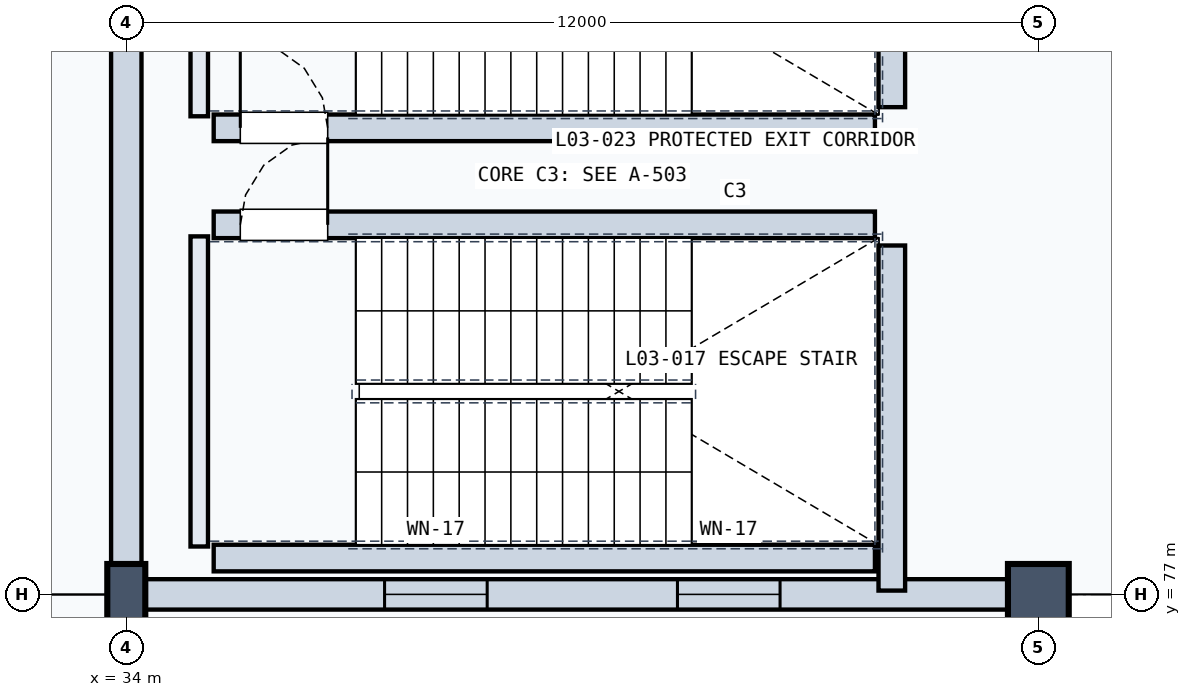
"""IFC4 building model, lengths in metres.
Left out: names, types, materials, properties, quantities, classifications, styles, units other than length and angle.
Written with IfcOpenShell. Run it as: python <this file> out.ifc"""

import sys

from ifc_helpers import new_model, si_unit, direction, frame, frame_2d, origin, origin_2d, place, context, subcontext, project, spatial, rectangle, extrude, element, fill, save


model = new_model("IFC4")
c1 = context("Model", 3, precision=1e-05, world=origin(), true_north=direction((0.0, 1.0)))
c2 = subcontext(c1, "Body", "Model", "MODEL_VIEW")
j1 = project(units=[si_unit("LENGTHUNIT", "METRE"), si_unit("PLANEANGLEUNIT", "RADIAN")], contexts=[c1])
p1 = place(None, origin())
s1 = spatial("IfcSite", under=j1, at=p1, CompositionType="ELEMENT")
p2 = place(p1, origin())
s2 = spatial("IfcBuilding", under=s1, at=p2, CompositionType="ELEMENT")
p3 = place(p2, frame((0.0, 0.0, 14.7)))
s3 = spatial("IfcBuildingStorey", under=s2, at=p3, CompositionType="ELEMENT", Elevation=14.7)
p4 = place(p3, frame((34.0, 77.0, 0.0), z_axis=(0.0, 0.0, 1.0), x_axis=(1.0, 0.0, 0.0)))
e1 = element("IfcColumn", 1, at=p4, inside=s3, PredefinedType="COLUMN", context=c2, shape_type="SweptSolid", body=[
    extrude(rectangle(XDim=0.5, YDim=0.8, at=origin_2d()), origin(), (0.0, 0.0, 1.0), 4.8),
])
p5 = place(p3, frame((46.0, 77.0, 0.0), z_axis=(0.0, 0.0, 1.0), x_axis=(1.0, 0.0, 0.0)))
e2 = element("IfcColumn", 2, at=p5, inside=s3, PredefinedType="COLUMN", context=c2, shape_type="SweptSolid", body=[
    extrude(rectangle(XDim=0.8, YDim=0.8, at=origin_2d()), origin(), (0.0, 0.0, 1.0), 4.8),
])
p6 = place(p3, frame((34.22, 77.0, 0.0), z_axis=(0.0, 0.0, 1.0), x_axis=(1.0, 0.0, 0.0)))
e3 = element("IfcWall", 3, at=p6, inside=s3, PredefinedType="SOLIDWALL", context=c2, shape_type="SweptSolid", body=[
    extrude(rectangle(XDim=11.56, YDim=0.4, at=frame_2d((5.78, 0.0))), origin(), (0.0, 0.0, 1.0), 3.79),
])
p7 = place(p6, frame((3.178, 0.0, 0.8)))
e4 = element("IfcOpeningElement", 4, at=p7, cuts=e3, PredefinedType="OPENING", context=c2, shape_type="SweptSolid", body=[
    extrude(rectangle(XDim=1.35, YDim=2.1, at=frame_2d((0.675, 1.05))), frame((0.0, 0.21, 0.0), z_axis=(0.0, -1.0, 0.0), x_axis=(1.0, 0.0, 0.0)), (0.0, 0.0, 1.0), 0.42),
])
p8 = place(p6, frame((7.032, 0.0, 0.8)))
e5 = element("IfcOpeningElement", 5, at=p8, cuts=e3, PredefinedType="OPENING", context=c2, shape_type="SweptSolid", body=[
    extrude(rectangle(XDim=1.35, YDim=2.1, at=frame_2d((0.675, 1.05))), frame((0.0, 0.21, 0.0), z_axis=(0.0, -1.0, 0.0), x_axis=(1.0, 0.0, 0.0)), (0.0, 0.0, 1.0), 0.42),
])
p9 = place(p3, frame((34.0, 77.22, 0.0), z_axis=(0.0, 0.0, 1.0), x_axis=(0.0, 1.0, 0.0)))
e6 = element("IfcWall", 6, at=p9, inside=s3, PredefinedType="SOLIDWALL", context=c2, shape_type="SweptSolid", body=[
    extrude(rectangle(XDim=10.56, YDim=0.4, at=frame_2d((5.28, 0.0))), origin(), (0.0, 0.0, 1.0), 3.79),
])
p10 = place(p3, frame((34.96, 77.63, 0.0), z_axis=(0.0, 0.0, 1.0), x_axis=(0.0, 1.0, 0.0)))
e7 = element("IfcWall", 7, at=p10, inside=s3, PredefinedType="SOLIDWALL", context=c2, shape_type="SweptSolid", body=[
    extrude(rectangle(XDim=4.08, YDim=0.23, at=frame_2d((2.04, 0.0))), origin(), (0.0, 0.0, 1.0), 4.46),
])
p11 = place(p3, frame((44.072, 77.05, 0.0), z_axis=(0.0, 0.0, 1.0), x_axis=(0.0, 1.0, 0.0)))
e8 = element("IfcWall", 8, at=p11, inside=s3, PredefinedType="SOLIDWALL", context=c2, shape_type="SweptSolid", body=[
    extrude(rectangle(XDim=4.54, YDim=0.35, at=frame_2d((2.27, 0.0))), origin(), (0.0, 0.0, 1.0), 4.46),
])
p12 = place(p3, frame((35.15, 77.478, 0.0), z_axis=(0.0, 0.0, 1.0), x_axis=(1.0, 0.0, 0.0)))
e9 = element("IfcWall", 9, at=p12, inside=s3, PredefinedType="SOLIDWALL", context=c2, shape_type="SweptSolid", body=[
    extrude(rectangle(XDim=8.7, YDim=0.35, at=frame_2d((4.35, 0.0))), origin(), (0.0, 0.0, 1.0), 4.46),
])
p13 = place(p3, frame((35.15, 81.862, 0.0), z_axis=(0.0, 0.0, 1.0), x_axis=(1.0, 0.0, 0.0)))
e10 = element("IfcWall", 10, at=p13, inside=s3, PredefinedType="SOLIDWALL", context=c2, shape_type="SweptSolid", body=[
    extrude(rectangle(XDim=8.7, YDim=0.35, at=frame_2d((4.35, 0.0))), origin(), (0.0, 0.0, 1.0), 4.46),
])
p14 = place(p13, frame((0.35, 0.0, 0.0)))
e11 = element("IfcOpeningElement", 11, at=p14, cuts=e10, PredefinedType="OPENING", context=c2, shape_type="SweptSolid", body=[
    extrude(rectangle(XDim=1.15, YDim=2.2, at=frame_2d((0.575, 1.1))), frame((0.0, 0.185, 0.0), z_axis=(0.0, -1.0, 0.0), x_axis=(1.0, 0.0, 0.0)), (0.0, 0.0, 1.0), 0.37),
])
p15 = place(p3, frame((34.96, 83.29, 0.0), z_axis=(0.0, 0.0, 1.0), x_axis=(0.0, 1.0, 0.0)))
e12 = element("IfcWall", 12, at=p15, inside=s3, PredefinedType="SOLIDWALL", context=c2, shape_type="SweptSolid", body=[
    extrude(rectangle(XDim=4.08, YDim=0.23, at=frame_2d((2.04, 0.0))), origin(), (0.0, 0.0, 1.0), 4.46),
])
p16 = place(p3, frame((44.072, 83.41, 0.0), z_axis=(0.0, 0.0, 1.0), x_axis=(0.0, 1.0, 0.0)))
e13 = element("IfcWall", 13, at=p16, inside=s3, PredefinedType="SOLIDWALL", context=c2, shape_type="SweptSolid", body=[
    extrude(rectangle(XDim=3.84, YDim=0.35, at=frame_2d((1.92, 0.0))), origin(), (0.0, 0.0, 1.0), 4.46),
])
p17 = place(p3, frame((35.15, 83.138, 0.0), z_axis=(0.0, 0.0, 1.0), x_axis=(1.0, 0.0, 0.0)))
e14 = element("IfcWall", 14, at=p17, inside=s3, PredefinedType="SOLIDWALL", context=c2, shape_type="SweptSolid", body=[
    extrude(rectangle(XDim=8.7, YDim=0.35, at=frame_2d((4.35, 0.0))), origin(), (0.0, 0.0, 1.0), 4.46),
])
p18 = place(p17, frame((0.35, 0.0, 0.0)))
e15 = element("IfcOpeningElement", 15, at=p18, cuts=e14, PredefinedType="OPENING", context=c2, shape_type="SweptSolid", body=[
    extrude(rectangle(XDim=1.15, YDim=2.2, at=frame_2d((0.575, 1.1))), frame((0.0, 0.185, 0.0), z_axis=(0.0, -1.0, 0.0), x_axis=(1.0, 0.0, 0.0)), (0.0, 0.0, 1.0), 0.37),
])
p19 = place(p7, origin())
e16 = element("IfcWindow", 16, at=p19, inside=s3, PartitioningType="SINGLE_PANEL", PredefinedType="WINDOW", context=c2, shape_type="SweptSolid", body=[
    extrude(rectangle(XDim=1.35, YDim=2.1, at=frame_2d((0.675, 1.05))), frame((0.0, 0.03, 0.0), z_axis=(0.0, -1.0, 0.0), x_axis=(1.0, 0.0, 0.0)), (0.0, 0.0, 1.0), 0.06),
])
fill(e4, e16)
p20 = place(p8, origin())
e17 = element("IfcWindow", 17, at=p20, inside=s3, PartitioningType="SINGLE_PANEL", PredefinedType="WINDOW", context=c2, shape_type="SweptSolid", body=[
    extrude(rectangle(XDim=1.35, YDim=2.1, at=frame_2d((0.675, 1.05))), frame((0.0, 0.03, 0.0), z_axis=(0.0, -1.0, 0.0), x_axis=(1.0, 0.0, 0.0)), (0.0, 0.0, 1.0), 0.06),
])
fill(e5, e17)
p21 = place(p14, origin())
e18 = element("IfcDoor", 18, at=p21, inside=s3, OperationType="SINGLE_SWING_RIGHT", PredefinedType="DOOR", context=c2, shape_type="SweptSolid", body=[
    extrude(rectangle(XDim=1.15, YDim=2.2, at=frame_2d((0.575, 1.1))), frame((0.0, 0.025, 0.0), z_axis=(0.0, -1.0, 0.0), x_axis=(1.0, 0.0, 0.0)), (0.0, 0.0, 1.0), 0.05),
])
fill(e11, e18)
p22 = place(p18, origin())
e19 = element("IfcDoor", 19, at=p22, inside=s3, OperationType="SINGLE_SWING_LEFT", PredefinedType="DOOR", context=c2, shape_type="SweptSolid", body=[
    extrude(rectangle(XDim=1.15, YDim=2.2, at=frame_2d((0.575, 1.1))), frame((0.0, 0.025, 0.0), z_axis=(0.0, -1.0, 0.0), x_axis=(1.0, 0.0, 0.0)), (0.0, 0.0, 1.0), 0.05),
])
fill(e15, e19)
save(model, sys.argv[1])
